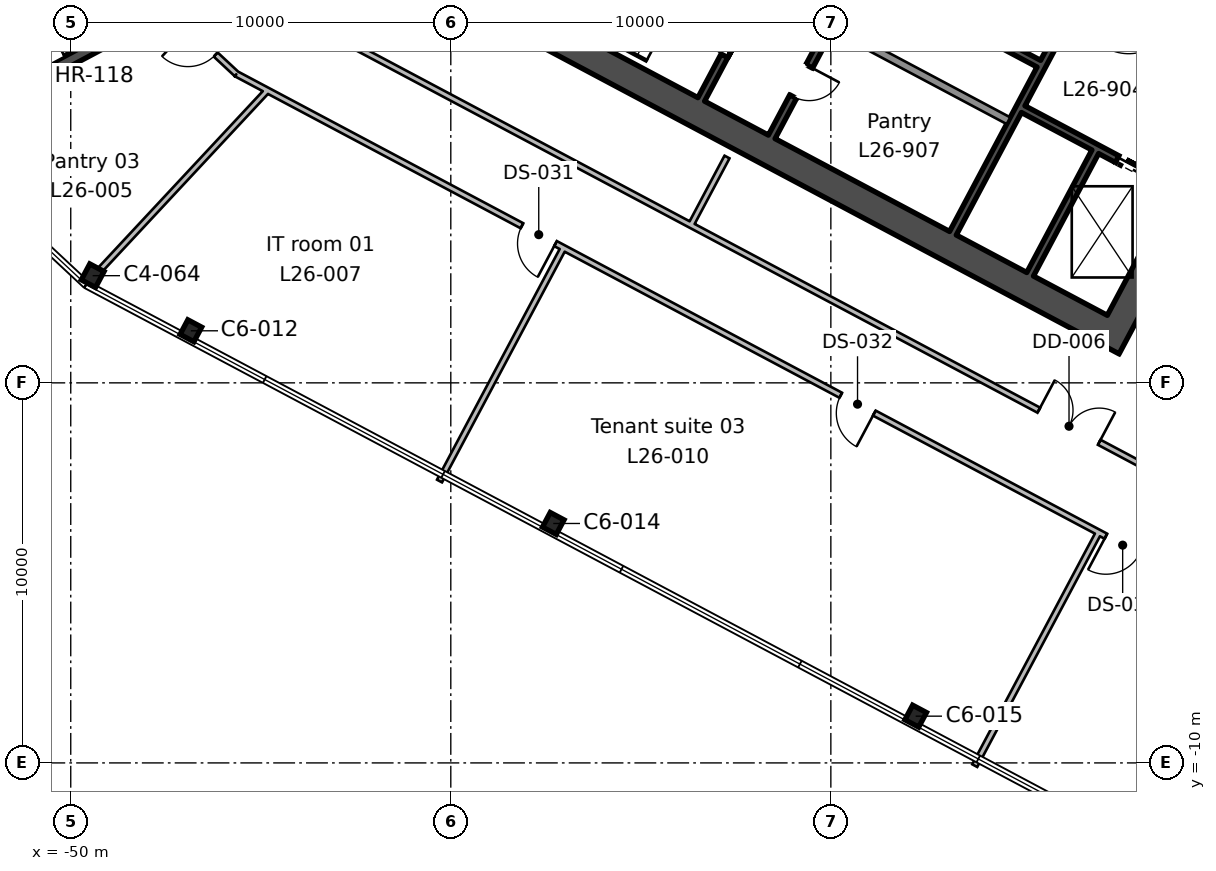
"""IFC4 building model, lengths in metres.
Left out: names, types, materials, properties, quantities, classifications, styles, units other than length and angle.
Written with IfcOpenShell. Run it as: python <this file> out.ifc"""

import sys

from ifc_helpers import new_model, si_unit, direction, frame, frame_2d, origin, origin_2d, place, context, subcontext, project, spatial, rectangle, i_section, extrude, element, fill, save


model = new_model("IFC4")
c1 = context("Model", 3, precision=1e-05, world=origin(), true_north=direction((0.0, 1.0)))
c2 = subcontext(c1, "Body", "Model", "MODEL_VIEW")
j1 = project(units=[si_unit("LENGTHUNIT", "METRE"), si_unit("PLANEANGLEUNIT", "RADIAN")], contexts=[c1])
p1 = place(None, origin())
s1 = spatial("IfcSite", under=j1, at=p1, CompositionType="ELEMENT")
p2 = place(p1, origin())
s2 = spatial("IfcBuilding", under=s1, at=p2, CompositionType="ELEMENT")
p3 = place(p2, frame((0.0, 0.0, 130.2)))
s3 = spatial("IfcBuildingStorey", under=s2, at=p3, CompositionType="ELEMENT", Elevation=130.2)
for number, where, z_axis, x_axis in (
    (1, (-27.768, -8.77, 0.0), (0.0, 0.0, 1.0), (0.883, -0.469, 0.0)),
    (2, (-37.304, -3.7, 0.0), (0.0, 0.0, 1.0), (0.883, -0.469, 0.0)),
    (3, (-46.839, 1.37, 0.0), (0.0, 0.0, 1.0), (0.883, -0.469, 0.0)),
):
    element("IfcColumn", number, at=place(p3, frame(where, z_axis=z_axis, x_axis=x_axis)), inside=s3, PredefinedType="COLUMN", context=c2, shape_type="SweptSolid", body=[
        extrude(i_section(OverallWidth=0.412, OverallDepth=0.434, WebThickness=0.036, FlangeThickness=0.057, FilletRadius=0.015, at=origin_2d()), origin(), (0.0, 0.0, 1.0), 4.0),
    ])
p4 = place(p3, frame((-49.423, 2.82, 0.0), z_axis=(0.0, 0.0, 1.0), x_axis=(0.882947592859, -0.469471562786, 0.0)))
e4 = element("IfcColumn", 4, at=p4, inside=s3, PredefinedType="COLUMN", context=c2, shape_type="SweptSolid", body=[
    extrude(i_section(OverallWidth=0.424, OverallDepth=0.475, WebThickness=0.048, FlangeThickness=0.077, FilletRadius=0.015, at=origin_2d()), origin(), (0.0, 0.0, 1.0), 4.0),
])
p5 = place(p3, frame((-13.498, 18.333, 0.0), z_axis=(0.0, 0.0, 1.0), x_axis=(-0.469469918705, -0.88294846703, 0.0)))
e5 = element("IfcWall", 5, at=p5, inside=s3, PredefinedType="SHEAR", context=c2, shape_type="SweptSolid", body=[
    extrude(rectangle(XDim=19.7, YDim=0.75, at=frame_2d((9.85, 0.0))), origin(), (0.0, 0.0, 1.0), 4.0),
])
p6 = place(p5, frame((6.85, 0.0, 0.0)))
e6 = element("IfcOpeningElement", 6, at=p6, cuts=e5, PredefinedType="OPENING", context=c2, shape_type="SweptSolid", body=[
    extrude(rectangle(XDim=2.4, YDim=2.4, at=frame_2d((1.2, 1.2))), frame((0.0, 0.385, 0.0), z_axis=(0.0, -1.0, 0.0), x_axis=(1.0, 0.0, 0.0)), (0.0, 0.0, 1.0), 0.77),
])
p7 = place(p3, frame((-22.902, 1.446, 0.0), z_axis=(0.0, 0.0, 1.0), x_axis=(-0.88294509198, 0.469476266226, 0.0)))
e7 = element("IfcWall", 7, at=p7, inside=s3, PredefinedType="SHEAR", context=c2, shape_type="SweptSolid", body=[
    extrude(rectangle(XDim=20.2, YDim=0.75, at=frame_2d((10.1, 0.0))), origin(), (0.0, 0.0, 1.0), 4.0),
])
p8 = place(p3, frame((-23.043, 6.08, 0.0), z_axis=(0.0, 0.0, 1.0), x_axis=(-0.469494272526, -0.882935517501, 0.0)))
e8 = element("IfcWall", 8, at=p8, inside=s3, PredefinedType="SHEAR", context=c2, shape_type="SweptSolid", body=[
    extrude(rectangle(XDim=3.65, YDim=0.2, at=frame_2d((1.825, 0.0))), origin(), (0.0, 0.0, 1.0), 4.0),
])
p9 = place(p3, frame((-23.36, 10.382, 0.0), z_axis=(0.0, 0.0, 1.0), x_axis=(-0.469480409012, -0.88294288918, 0.0)))
e9 = element("IfcWall", 9, at=p9, inside=s3, PredefinedType="SHEAR", context=c2, shape_type="SweptSolid", body=[
    extrude(rectangle(XDim=7.3, YDim=0.2, at=frame_2d((3.65, 0.0))), origin(), (0.0, 0.0, 1.0), 4.0),
])
p10 = place(p3, frame((-28.128, 12.917, 0.0), z_axis=(0.0, 0.0, 1.0), x_axis=(-0.469454336211, -0.882956752176, 0.0)))
e10 = element("IfcWall", 10, at=p10, inside=s3, PredefinedType="SHEAR", context=c2, shape_type="SweptSolid", body=[
    extrude(rectangle(XDim=7.3, YDim=0.2, at=frame_2d((3.65, 0.0))), origin(), (0.0, 0.0, 1.0), 4.0),
])
p11 = place(p10, frame((2.7, 0.0, 0.0)))
e11 = element("IfcOpeningElement", 11, at=p11, cuts=e10, PredefinedType="OPENING", context=c2, shape_type="SweptSolid", body=[
    extrude(rectangle(XDim=0.9, YDim=2.1, at=frame_2d((0.45, 1.05))), frame((0.0, 0.11, 0.0), z_axis=(0.0, -1.0, 0.0), x_axis=(1.0, 0.0, 0.0)), (0.0, 0.0, 1.0), 0.22),
])
p12 = place(p10, frame((5.2, 0.0, 0.0)))
e12 = element("IfcOpeningElement", 12, at=p12, cuts=e10, PredefinedType="OPENING", context=c2, shape_type="SweptSolid", body=[
    extrude(rectangle(XDim=0.9, YDim=2.1, at=frame_2d((0.45, 1.05))), frame((0.0, 0.11, 0.0), z_axis=(0.0, -1.0, 0.0), x_axis=(1.0, 0.0, 0.0)), (0.0, 0.0, 1.0), 0.22),
])
p13 = place(p3, frame((-29.982, 13.903, 0.0), z_axis=(0.0, 0.0, 1.0), x_axis=(-0.469454336211, -0.882956752176, 0.0)))
e13 = element("IfcWall", 13, at=p13, inside=s3, PredefinedType="SHEAR", context=c2, shape_type="SweptSolid", body=[
    extrude(rectangle(XDim=7.3, YDim=0.2, at=frame_2d((3.65, 0.0))), origin(), (0.0, 0.0, 1.0), 4.0),
])
p14 = place(p13, frame((4.8, 0.0, 0.0)))
e14 = element("IfcOpeningElement", 14, at=p14, cuts=e13, PredefinedType="OPENING", context=c2, shape_type="SweptSolid", body=[
    extrude(rectangle(XDim=1.2, YDim=2.1, at=frame_2d((0.6, 1.05))), frame((0.0, 0.11, 0.0), z_axis=(0.0, -1.0, 0.0), x_axis=(1.0, 0.0, 0.0)), (0.0, 0.0, 1.0), 0.22),
])
p15 = place(p3, frame((-19.252, 8.311, 0.0), z_axis=(0.0, 0.0, 1.0), x_axis=(-0.882955722218, 0.469456273365, 0.0)))
e15 = element("IfcWall", 15, at=p15, inside=s3, PredefinedType="SHEAR", context=c2, shape_type="SweptSolid", body=[
    extrude(rectangle(XDim=10.0, YDim=0.2, at=frame_2d((5.0, 0.0))), origin(), (0.0, 0.0, 1.0), 4.0),
])
p16 = place(p15, frame((2.1, 0.0, 0.0)))
e16 = element("IfcOpeningElement", 16, at=p16, cuts=e15, PredefinedType="OPENING", context=c2, shape_type="SweptSolid", body=[
    extrude(rectangle(XDim=1.2, YDim=2.1, at=frame_2d((0.6, 1.05))), frame((0.0, 0.11, 0.0), z_axis=(0.0, -1.0, 0.0), x_axis=(1.0, 0.0, 0.0)), (0.0, 0.0, 1.0), 0.22),
])
p17 = place(p3, frame((-24.528, 8.398, 0.0), z_axis=(0.0, 0.0, 1.0), x_axis=(-0.882953967957, 0.469459572775, 0.0)))
e17 = element("IfcWall", 17, at=p17, inside=s3, PredefinedType="SHEAR", context=c2, shape_type="SweptSolid", body=[
    extrude(rectangle(XDim=5.2, YDim=0.2, at=frame_2d((2.6, 0.0))), origin(), (0.0, 0.0, 1.0), 4.0),
])
p18 = place(p3, frame((-20.965, 5.088, 0.0), z_axis=(0.0, 0.0, 1.0), x_axis=(-0.882925986334, 0.469512196493, 0.0)))
e18 = element("IfcWall", 18, at=p18, inside=s3, PredefinedType="SHEAR", context=c2, shape_type="SweptSolid", body=[
    extrude(rectangle(XDim=4.5, YDim=0.2, at=frame_2d((2.25, 0.0))), origin(), (0.0, 0.0, 1.0), 4.0),
])
p19 = place(p18, frame((0.6, 0.0, 0.0)))
e19 = element("IfcOpeningElement", 19, at=p19, cuts=e18, PredefinedType="OPENING", context=c2, shape_type="SweptSolid", body=[
    extrude(rectangle(XDim=1.1, YDim=2.1, at=frame_2d((0.55, 1.05))), frame((0.0, 0.11, 0.0), z_axis=(0.0, -1.0, 0.0), x_axis=(1.0, 0.0, 0.0)), (0.0, 0.0, 1.0), 0.22),
])
p20 = place(p3, frame((-25.326, 6.897, 0.0), z_axis=(0.0, 0.0, 1.0), x_axis=(-0.882953967957, 0.469459572775, 0.0)))
e20 = element("IfcWall", 20, at=p20, inside=s3, PredefinedType="SOLIDWALL", context=c2, shape_type="SweptSolid", body=[
    extrude(rectangle(XDim=5.2, YDim=0.2, at=frame_2d((2.6, 0.0))), origin(), (0.0, 0.0, 1.0), 4.0),
])
p21 = place(p3, frame((-45.297, 11.007, 0.0), z_axis=(0.0, 0.0, 1.0), x_axis=(-0.882951519127, -0.469464178475, 0.0)))
e21 = element("IfcWall", 21, at=p21, inside=s3, PredefinedType="SHEAR", context=c2, shape_type="SweptSolid", body=[
    extrude(rectangle(XDim=8.3, YDim=0.3, at=frame_2d((4.15, 0.0))), origin(), (0.0, 0.0, 1.0), 4.0),
])
p22 = place(p3, frame((-44.826, 7.695, 0.0), z_axis=(0.0, 0.0, 1.0), x_axis=(-0.681994231605, -0.731357551446, 0.0)))
e22 = element("IfcWall", 22, at=p22, inside=s3, PredefinedType="PARTITIONING", context=c2, shape_type="SweptSolid", body=[
    extrude(rectangle(XDim=6.444, YDim=0.15, at=frame_2d((3.222, 0.0))), origin(), (0.0, 0.0, 1.0), 3.64),
])
p23 = place(p3, frame((-37.034, 3.552, 0.0), z_axis=(0.0, 0.0, 1.0), x_axis=(-0.469541311651, -0.882910503196, 0.0)))
e23 = element("IfcWall", 23, at=p23, inside=s3, PredefinedType="PARTITIONING", context=c2, shape_type="SweptSolid", body=[
    extrude(rectangle(XDim=6.95, YDim=0.15, at=frame_2d((3.475, 0.0))), origin(), (0.0, 0.0, 1.0), 3.64),
])
p24 = place(p3, frame((-44.88, 7.724, 0.0), z_axis=(0.0, 0.0, 1.0), x_axis=(-0.883060479617, 0.469259192067, 0.0)))
e24 = element("IfcWall", 24, at=p24, inside=s3, PredefinedType="PARTITIONING", context=c2, shape_type="SweptSolid", body=[
    extrude(rectangle(XDim=0.858, YDim=0.15, at=frame_2d((0.429, 0.0))), origin(), (0.0, 0.0, 1.0), 3.64),
])
p25 = place(p3, frame((-45.638, 8.127, 0.0), z_axis=(0.0, 0.0, 1.0), x_axis=(-0.731136071802, 0.682231664839, 0.0)))
e25 = element("IfcWall", 25, at=p25, inside=s3, PredefinedType="PARTITIONING", context=c2, shape_type="SweptSolid", body=[
    extrude(rectangle(XDim=2.411, YDim=0.15, at=frame_2d((1.206, 0.0))), origin(), (0.0, 0.0, 1.0), 3.64),
])
p26 = place(p25, frame((0.75, 0.0, 0.0)))
e26 = element("IfcOpeningElement", 26, at=p26, cuts=e25, PredefinedType="OPENING", context=c2, shape_type="SweptSolid", body=[
    extrude(rectangle(XDim=1.0, YDim=2.1, at=frame_2d((0.5, 1.05))), frame((0.0, 0.085, 0.0), z_axis=(0.0, -1.0, 0.0), x_axis=(1.0, 0.0, 0.0)), (0.0, 0.0, 1.0), 0.17),
])
p27 = place(p3, frame((-13.802, -8.8, 0.0), z_axis=(0.0, 0.0, 1.0), x_axis=(-0.882950330338, 0.4694664143, 0.0)))
e27 = element("IfcWall", 27, at=p27, inside=s3, PredefinedType="PARTITIONING", context=c2, shape_type="SweptSolid", body=[
    extrude(rectangle(XDim=35.198, YDim=0.15, at=frame_2d((17.599, 0.0))), origin(), (0.0, 0.0, 1.0), 3.64),
])
p28 = place(p27, frame((26.55, 0.0, 0.0)))
e28 = element("IfcOpeningElement", 28, at=p28, cuts=e27, PredefinedType="OPENING", context=c2, shape_type="SweptSolid", body=[
    extrude(rectangle(XDim=1.0, YDim=2.1, at=frame_2d((0.5, 1.05))), frame((0.0, 0.085, 0.0), z_axis=(0.0, -1.0, 0.0), x_axis=(1.0, 0.0, 0.0)), (0.0, 0.0, 1.0), 0.17),
])
p29 = place(p27, frame((17.05, 0.0, 0.0)))
e29 = element("IfcOpeningElement", 29, at=p29, cuts=e27, PredefinedType="OPENING", context=c2, shape_type="SweptSolid", body=[
    extrude(rectangle(XDim=1.0, YDim=2.1, at=frame_2d((0.5, 1.05))), frame((0.0, 0.085, 0.0), z_axis=(0.0, -1.0, 0.0), x_axis=(1.0, 0.0, 0.0)), (0.0, 0.0, 1.0), 0.17),
])
p30 = place(p27, frame((9.149, 0.0, 0.0)))
e30 = element("IfcOpeningElement", 30, at=p30, cuts=e27, PredefinedType="OPENING", context=c2, shape_type="SweptSolid", body=[
    extrude(rectangle(XDim=1.0, YDim=2.1, at=frame_2d((0.5, 1.05))), frame((0.0, 0.085, 0.0), z_axis=(0.0, -1.0, 0.0), x_axis=(1.0, 0.0, 0.0)), (0.0, 0.0, 1.0), 0.17),
])
p31 = place(p3, frame((-33.685, 4.15, 0.0), z_axis=(0.0, 0.0, 1.0), x_axis=(-0.882957675396, 0.469452599801, 0.0)))
e31 = element("IfcWall", 31, at=p31, inside=s3, PredefinedType="PARTITIONING", context=c2, shape_type="SweptSolid", body=[
    extrude(rectangle(XDim=12.144, YDim=0.15, at=frame_2d((6.072, 0.0))), origin(), (0.0, 0.0, 1.0), 3.64),
])
p32 = place(p3, frame((-22.951, -3.936, 0.0), z_axis=(0.0, 0.0, 1.0), x_axis=(-0.469541311651, -0.882910503196, 0.0)))
e32 = element("IfcWall", 32, at=p32, inside=s3, PredefinedType="PARTITIONING", context=c2, shape_type="SweptSolid", body=[
    extrude(rectangle(XDim=6.95, YDim=0.15, at=frame_2d((3.475, 0.0))), origin(), (0.0, 0.0, 1.0), 3.64),
])
p33 = place(p3, frame((-13.8, -6.423, 0.0), z_axis=(0.0, 0.0, 1.0), x_axis=(-0.882948498314, 0.469469859869, 0.0)))
e33 = element("IfcWall", 33, at=p33, inside=s3, PredefinedType="PARTITIONING", context=c2, shape_type="SweptSolid", body=[
    extrude(rectangle(XDim=22.521, YDim=0.15, at=frame_2d((11.261, 0.0))), origin(), (0.0, 0.0, 1.0), 3.64),
])
p34 = place(p33, frame((10.35, 0.0, 0.0)))
e34 = element("IfcOpeningElement", 34, at=p34, cuts=e33, PredefinedType="OPENING", context=c2, shape_type="SweptSolid", body=[
    extrude(rectangle(XDim=1.8, YDim=2.1, at=frame_2d((0.9, 1.05))), frame((0.0, 0.085, 0.0), z_axis=(0.0, -1.0, 0.0), x_axis=(1.0, 0.0, 0.0)), (0.0, 0.0, 1.0), 0.17),
])
p35 = place(p3, frame((-32.732, 5.943, 0.0), z_axis=(0.0, 0.0, 1.0), x_axis=(-0.469339803677, -0.88301763781, 0.0)))
e35 = element("IfcWall", 35, at=p35, inside=s3, PredefinedType="PARTITIONING", context=c2, shape_type="SweptSolid", body=[
    extrude(rectangle(XDim=2.031, YDim=0.15, at=frame_2d((1.015, 0.0))), origin(), (0.0, 0.0, 1.0), 3.64),
])
p36 = place(p14, frame((1.2, 0.0, 0.0), z_axis=(0.0, 0.0, 1.0), x_axis=(-1.0, 0.0, 0.0)))
e36 = element("IfcDoor", 36, at=p36, inside=s3, OperationType="SINGLE_SWING_RIGHT", PredefinedType="DOOR", context=c2, shape_type="SweptSolid", body=[
    extrude(rectangle(XDim=1.2, YDim=2.1, at=frame_2d((0.6, 1.05))), frame((0.0, 0.025, 0.0), z_axis=(0.0, -1.0, 0.0), x_axis=(1.0, 0.0, 0.0)), (0.0, 0.0, 1.0), 0.05),
])
fill(e14, e36)
p37 = place(p19, origin())
e37 = element("IfcDoor", 37, at=p37, inside=s3, OperationType="DOUBLE_DOOR_SLIDING", PredefinedType="DOOR", context=c2, shape_type="SweptSolid", body=[
    extrude(rectangle(XDim=1.1, YDim=2.1, at=frame_2d((0.55, 1.05))), frame((0.0, 0.025, 0.0), z_axis=(0.0, -1.0, 0.0), x_axis=(1.0, 0.0, 0.0)), (0.0, 0.0, 1.0), 0.05),
])
fill(e19, e37)
p38 = place(p12, origin())
e38 = element("IfcDoor", 38, at=p38, inside=s3, OperationType="SINGLE_SWING_LEFT", PredefinedType="DOOR", context=c2, shape_type="SweptSolid", body=[
    extrude(rectangle(XDim=0.9, YDim=2.1, at=frame_2d((0.45, 1.05))), frame((0.0, 0.025, 0.0), z_axis=(0.0, -1.0, 0.0), x_axis=(1.0, 0.0, 0.0)), (0.0, 0.0, 1.0), 0.05),
])
fill(e12, e38)
p39 = place(p34, frame((1.8, 0.0, 0.0), z_axis=(0.0, 0.0, 1.0), x_axis=(-1.0, 0.0, 0.0)))
e39 = element("IfcDoor", 39, at=p39, inside=s3, OperationType="DOUBLE_DOOR_SINGLE_SWING", PredefinedType="DOOR", context=c2, shape_type="SweptSolid", body=[
    extrude(rectangle(XDim=1.8, YDim=2.1, at=frame_2d((0.9, 1.05))), frame((0.0, 0.025, 0.0), z_axis=(0.0, -1.0, 0.0), x_axis=(1.0, 0.0, 0.0)), (0.0, 0.0, 1.0), 0.05),
])
fill(e34, e39)
p40 = place(p26, origin())
e40 = element("IfcDoor", 40, at=p40, inside=s3, OperationType="SINGLE_SWING_RIGHT", PredefinedType="DOOR", context=c2, shape_type="SweptSolid", body=[
    extrude(rectangle(XDim=1.0, YDim=2.1, at=frame_2d((0.5, 1.05))), frame((0.0, 0.025, 0.0), z_axis=(0.0, -1.0, 0.0), x_axis=(1.0, 0.0, 0.0)), (0.0, 0.0, 1.0), 0.05),
])
fill(e26, e40)
p41 = place(p28, origin())
e41 = element("IfcDoor", 41, at=p41, inside=s3, OperationType="SINGLE_SWING_LEFT", PredefinedType="DOOR", context=c2, shape_type="SweptSolid", body=[
    extrude(rectangle(XDim=1.0, YDim=2.1, at=frame_2d((0.5, 1.05))), frame((0.0, 0.025, 0.0), z_axis=(0.0, -1.0, 0.0), x_axis=(1.0, 0.0, 0.0)), (0.0, 0.0, 1.0), 0.05),
])
fill(e28, e41)
p42 = place(p29, origin())
e42 = element("IfcDoor", 42, at=p42, inside=s3, OperationType="SINGLE_SWING_LEFT", PredefinedType="DOOR", context=c2, shape_type="SweptSolid", body=[
    extrude(rectangle(XDim=1.0, YDim=2.1, at=frame_2d((0.5, 1.05))), frame((0.0, 0.025, 0.0), z_axis=(0.0, -1.0, 0.0), x_axis=(1.0, 0.0, 0.0)), (0.0, 0.0, 1.0), 0.05),
])
fill(e29, e42)
p43 = place(p30, origin())
e43 = element("IfcDoor", 43, at=p43, inside=s3, OperationType="SINGLE_SWING_RIGHT", PredefinedType="DOOR", context=c2, shape_type="SweptSolid", body=[
    extrude(rectangle(XDim=1.0, YDim=2.1, at=frame_2d((0.5, 1.05))), frame((0.0, 0.025, 0.0), z_axis=(0.0, -1.0, 0.0), x_axis=(1.0, 0.0, 0.0)), (0.0, 0.0, 1.0), 0.05),
])
fill(e30, e43)
save(model, sys.argv[1])
